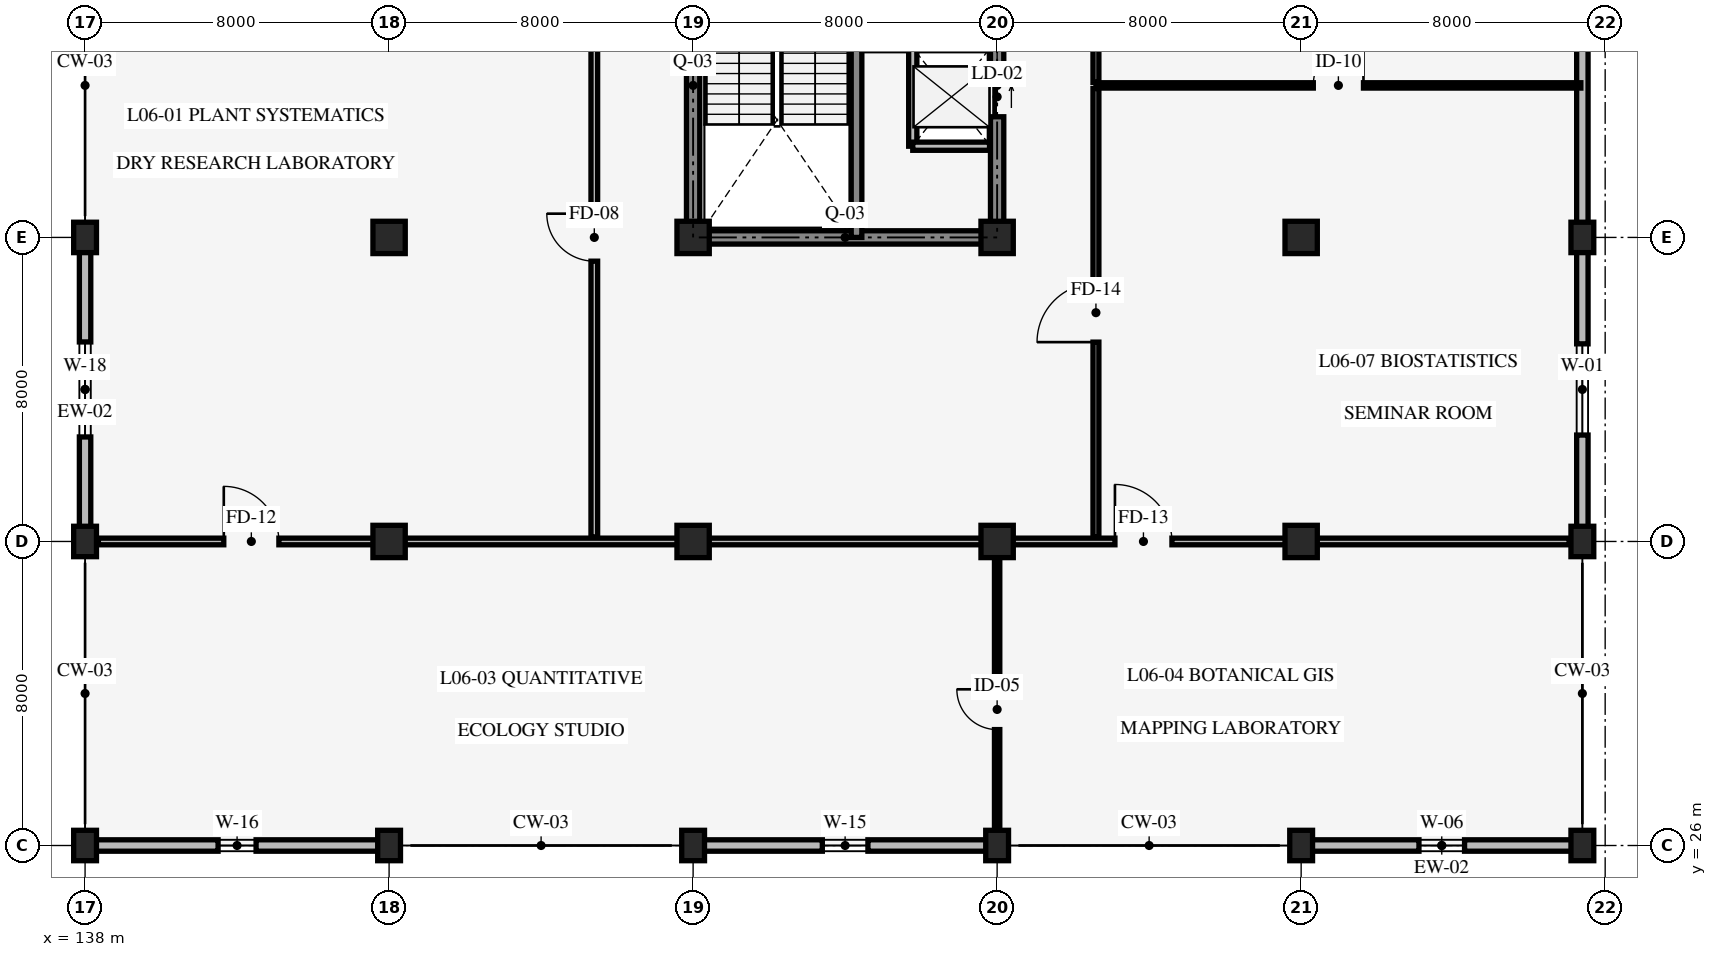
"""IFC4 building model, lengths in metres.
Left out: names, types, materials, properties, quantities, classifications, styles, units other than length and angle.
Written with IfcOpenShell. Run it as: python <this file> out.ifc"""

import sys

from ifc_helpers import new_model, si_unit, direction, frame, frame_2d, origin, origin_2d, place, context, subcontext, project, spatial, rectangle, extrude, element, fill, save


model = new_model("IFC4")
c1 = context("Model", 3, precision=1e-05, world=origin(), true_north=direction((0.0, 1.0)))
c2 = subcontext(c1, "Body", "Model", "MODEL_VIEW")
j1 = project(units=[si_unit("LENGTHUNIT", "METRE"), si_unit("PLANEANGLEUNIT", "RADIAN")], contexts=[c1])
p1 = place(None, origin())
s1 = spatial("IfcSite", under=j1, at=p1, CompositionType="ELEMENT")
p2 = place(p1, origin())
s2 = spatial("IfcBuilding", under=s1, at=p2, CompositionType="ELEMENT")
p3 = place(p2, frame((0.0, 0.0, 23.4)))
s3 = spatial("IfcBuildingStorey", under=s2, at=p3, CompositionType="ELEMENT", Elevation=23.4)
p4 = place(p3, frame((154.0, 42.0, 0.0), z_axis=(0.0, 0.0, 1.0), x_axis=(1.0, 0.0, 0.0)))
e1 = element("IfcWall", 1, at=p4, inside=s3, PredefinedType="SHEAR", context=c2, shape_type="SweptSolid", body=[
    extrude(rectangle(XDim=8.0, YDim=0.35, at=frame_2d((4.0, 0.0))), origin(), (0.0, 0.0, 1.0), 3.95),
])
p5 = place(p3, frame((162.0, 42.0, 0.0), z_axis=(0.0, 0.0, 1.0), x_axis=(0.0, 1.0, 0.0)))
e2 = element("IfcWall", 2, at=p5, inside=s3, PredefinedType="SHEAR", context=c2, shape_type="SweptSolid", body=[
    extrude(rectangle(XDim=8.0, YDim=0.35, at=frame_2d((4.0, 0.0))), origin(), (0.0, 0.0, 1.0), 3.95),
])
p6 = place(p5, frame((3.175, 0.0, 0.0)))
e3 = element("IfcOpeningElement", 3, at=p6, cuts=e2, PredefinedType="OPENING", context=c2, shape_type="SweptSolid", body=[
    extrude(rectangle(XDim=1.05, YDim=2.2, at=frame_2d((0.525, 1.1))), frame((0.0, 0.185, 0.0), z_axis=(0.0, -1.0, 0.0), x_axis=(1.0, 0.0, 0.0)), (0.0, 0.0, 1.0), 0.37),
])
p7 = place(p3, frame((154.0, 50.0, 0.0), z_axis=(0.0, 0.0, 1.0), x_axis=(0.0, -1.0, 0.0)))
e4 = element("IfcWall", 4, at=p7, inside=s3, PredefinedType="SHEAR", context=c2, shape_type="SweptSolid", body=[
    extrude(rectangle(XDim=8.0, YDim=0.35, at=frame_2d((4.0, 0.0))), origin(), (0.0, 0.0, 1.0), 3.95),
])
p8 = place(p3, frame((158.3, 42.0, 0.0), z_axis=(0.0, 0.0, 1.0), x_axis=(0.0, 1.0, 0.0)))
e5 = element("IfcWall", 5, at=p8, inside=s3, PredefinedType="SHEAR", context=c2, shape_type="SweptSolid", body=[
    extrude(rectangle(XDim=8.0, YDim=0.28, at=frame_2d((4.0, 0.0))), origin(), (0.0, 0.0, 1.0), 3.95),
])
for number, where, z_axis, x_axis in (
    (6, (138.0, 26.0, 0.0), (0.0, 0.0, 1.0), (1.0, 0.0, 0.0)),
    (7, (138.0, 34.0, 0.0), (0.0, 0.0, 1.0), (1.0, 0.0, 0.0)),
    (8, (138.0, 42.0, 0.0), (0.0, 0.0, 1.0), (1.0, 0.0, 0.0)),
    (9, (146.0, 26.0, 0.0), (0.0, 0.0, 1.0), (1.0, 0.0, 0.0)),
):
    element("IfcColumn", number, at=place(p3, frame(where, z_axis=z_axis, x_axis=x_axis)), inside=s3, PredefinedType="COLUMN", context=c2, shape_type="SweptSolid", body=[
        extrude(rectangle(XDim=0.6, YDim=0.8, at=origin_2d()), origin(), (0.0, 0.0, 1.0), 4.2),
    ])
for number, where, z_axis, x_axis in (
    (10, (146.0, 34.0, 0.0), (0.0, 0.0, 1.0), (1.0, 0.0, 0.0)),
    (11, (146.0, 42.0, 0.0), (0.0, 0.0, 1.0), (1.0, 0.0, 0.0)),
):
    element("IfcColumn", number, at=place(p3, frame(where, z_axis=z_axis, x_axis=x_axis)), inside=s3, PredefinedType="COLUMN", context=c2, shape_type="SweptSolid", body=[
        extrude(rectangle(XDim=0.85, YDim=0.85, at=origin_2d()), origin(), (0.0, 0.0, 1.0), 4.2),
    ])
p9 = place(p3, frame((154.0, 26.0, 0.0), z_axis=(0.0, 0.0, 1.0), x_axis=(1.0, 0.0, 0.0)))
e12 = element("IfcColumn", 12, at=p9, inside=s3, PredefinedType="COLUMN", context=c2, shape_type="SweptSolid", body=[
    extrude(rectangle(XDim=0.6, YDim=0.8, at=origin_2d()), origin(), (0.0, 0.0, 1.0), 4.2),
])
for number, where, z_axis, x_axis in (
    (13, (154.0, 34.0, 0.0), (0.0, 0.0, 1.0), (1.0, 0.0, 0.0)),
    (14, (154.0, 42.0, 0.0), (0.0, 0.0, 1.0), (1.0, 0.0, 0.0)),
):
    element("IfcColumn", number, at=place(p3, frame(where, z_axis=z_axis, x_axis=x_axis)), inside=s3, PredefinedType="COLUMN", context=c2, shape_type="SweptSolid", body=[
        extrude(rectangle(XDim=0.85, YDim=0.85, at=origin_2d()), origin(), (0.0, 0.0, 1.0), 4.2),
    ])
p10 = place(p3, frame((162.0, 26.0, 0.0), z_axis=(0.0, 0.0, 1.0), x_axis=(1.0, 0.0, 0.0)))
e15 = element("IfcColumn", 15, at=p10, inside=s3, PredefinedType="COLUMN", context=c2, shape_type="SweptSolid", body=[
    extrude(rectangle(XDim=0.6, YDim=0.8, at=origin_2d()), origin(), (0.0, 0.0, 1.0), 4.2),
])
for number, where, z_axis, x_axis in (
    (16, (162.0, 34.0, 0.0), (0.0, 0.0, 1.0), (1.0, 0.0, 0.0)),
    (17, (162.0, 42.0, 0.0), (0.0, 0.0, 1.0), (1.0, 0.0, 0.0)),
):
    element("IfcColumn", number, at=place(p3, frame(where, z_axis=z_axis, x_axis=x_axis)), inside=s3, PredefinedType="COLUMN", context=c2, shape_type="SweptSolid", body=[
        extrude(rectangle(XDim=0.85, YDim=0.85, at=origin_2d()), origin(), (0.0, 0.0, 1.0), 4.2),
    ])
p11 = place(p3, frame((170.0, 26.0, 0.0), z_axis=(0.0, 0.0, 1.0), x_axis=(1.0, 0.0, 0.0)))
e18 = element("IfcColumn", 18, at=p11, inside=s3, PredefinedType="COLUMN", context=c2, shape_type="SweptSolid", body=[
    extrude(rectangle(XDim=0.6, YDim=0.8, at=origin_2d()), origin(), (0.0, 0.0, 1.0), 4.2),
])
for number, where, z_axis, x_axis in (
    (19, (170.0, 34.0, 0.0), (0.0, 0.0, 1.0), (1.0, 0.0, 0.0)),
    (20, (170.0, 42.0, 0.0), (0.0, 0.0, 1.0), (1.0, 0.0, 0.0)),
):
    element("IfcColumn", number, at=place(p3, frame(where, z_axis=z_axis, x_axis=x_axis)), inside=s3, PredefinedType="COLUMN", context=c2, shape_type="SweptSolid", body=[
        extrude(rectangle(XDim=0.85, YDim=0.85, at=origin_2d()), origin(), (0.0, 0.0, 1.0), 4.2),
    ])
for number, where, z_axis, x_axis in (
    (21, (177.4, 26.0, 0.0), (0.0, 0.0, 1.0), (1.0, 0.0, 0.0)),
    (22, (177.4, 34.0, 0.0), (0.0, 0.0, 1.0), (1.0, 0.0, 0.0)),
    (23, (177.4, 42.0, 0.0), (0.0, 0.0, 1.0), (1.0, 0.0, 0.0)),
):
    element("IfcColumn", number, at=place(p3, frame(where, z_axis=z_axis, x_axis=x_axis)), inside=s3, PredefinedType="COLUMN", context=c2, shape_type="SweptSolid", body=[
        extrude(rectangle(XDim=0.6, YDim=0.8, at=origin_2d()), origin(), (0.0, 0.0, 1.0), 4.2),
    ])
p12 = place(p3, frame((177.4, 26.0, 0.0), z_axis=(0.0, 0.0, 1.0), x_axis=(-1.0, 0.0, 0.0)))
e24 = element("IfcWall", 24, at=p12, inside=s3, PredefinedType="STANDARD", context=c2, shape_type="SweptSolid", body=[
    extrude(rectangle(XDim=7.4, YDim=0.3, at=frame_2d((3.7, 0.0))), origin(), (0.0, 0.0, 1.0), 3.4),
])
p13 = place(p12, frame((3.1, 0.0, 0.85)))
e25 = element("IfcOpeningElement", 25, at=p13, cuts=e24, PredefinedType="OPENING", context=c2, shape_type="SweptSolid", body=[
    extrude(rectangle(XDim=1.2, YDim=1.2, at=frame_2d((0.6, 0.6))), frame((0.0, 0.16, 0.0), z_axis=(0.0, -1.0, 0.0), x_axis=(1.0, 0.0, 0.0)), (0.0, 0.0, 1.0), 0.32),
])
p14 = place(p3, frame((162.0, 26.0, 0.0), z_axis=(0.0, 0.0, 1.0), x_axis=(-1.0, 0.0, 0.0)))
e26 = element("IfcWall", 26, at=p14, inside=s3, PredefinedType="STANDARD", context=c2, shape_type="SweptSolid", body=[
    extrude(rectangle(XDim=8.0, YDim=0.3, at=frame_2d((4.0, 0.0))), origin(), (0.0, 0.0, 1.0), 3.4),
])
p15 = place(p14, frame((3.4, 0.0, 0.85)))
e27 = element("IfcOpeningElement", 27, at=p15, cuts=e26, PredefinedType="OPENING", context=c2, shape_type="SweptSolid", body=[
    extrude(rectangle(XDim=1.2, YDim=1.8, at=frame_2d((0.6, 0.9))), frame((0.0, 0.16, 0.0), z_axis=(0.0, -1.0, 0.0), x_axis=(1.0, 0.0, 0.0)), (0.0, 0.0, 1.0), 0.32),
])
p16 = place(p3, frame((146.0, 26.0, 0.0), z_axis=(0.0, 0.0, 1.0), x_axis=(-1.0, 0.0, 0.0)))
e28 = element("IfcWall", 28, at=p16, inside=s3, PredefinedType="STANDARD", context=c2, shape_type="SweptSolid", body=[
    extrude(rectangle(XDim=8.0, YDim=0.3, at=frame_2d((4.0, 0.0))), origin(), (0.0, 0.0, 1.0), 3.4),
])
p17 = place(p16, frame((3.5, 0.0, 0.85)))
e29 = element("IfcOpeningElement", 29, at=p17, cuts=e28, PredefinedType="OPENING", context=c2, shape_type="SweptSolid", body=[
    extrude(rectangle(XDim=1.0, YDim=1.5, at=frame_2d((0.5, 0.75))), frame((0.0, 0.16, 0.0), z_axis=(0.0, -1.0, 0.0), x_axis=(1.0, 0.0, 0.0)), (0.0, 0.0, 1.0), 0.32),
])
p18 = place(p3, frame((138.0, 34.0, 0.0), z_axis=(0.0, 0.0, 1.0), x_axis=(0.0, 1.0, 0.0)))
e30 = element("IfcWall", 30, at=p18, inside=s3, PredefinedType="STANDARD", context=c2, shape_type="SweptSolid", body=[
    extrude(rectangle(XDim=8.0, YDim=0.3, at=frame_2d((4.0, 0.0))), origin(), (0.0, 0.0, 1.0), 3.19),
])
p19 = place(p18, frame((2.75, 0.0, 0.85)))
e31 = element("IfcOpeningElement", 31, at=p19, cuts=e30, PredefinedType="OPENING", context=c2, shape_type="SweptSolid", body=[
    extrude(rectangle(XDim=2.5, YDim=1.8, at=frame_2d((1.25, 0.9))), frame((0.0, 0.16, 0.0), z_axis=(0.0, -1.0, 0.0), x_axis=(1.0, 0.0, 0.0)), (0.0, 0.0, 1.0), 0.32),
])
p20 = place(p3, frame((177.4, 50.0, 0.0), z_axis=(0.0, 0.0, 1.0), x_axis=(0.0, -1.0, 0.0)))
e32 = element("IfcWall", 32, at=p20, inside=s3, PredefinedType="STANDARD", context=c2, shape_type="SweptSolid", body=[
    extrude(rectangle(XDim=8.0, YDim=0.3, at=frame_2d((4.0, 0.0))), origin(), (0.0, 0.0, 1.0), 3.19),
])
p21 = place(p3, frame((177.4, 42.0, 0.0), z_axis=(0.0, 0.0, 1.0), x_axis=(0.0, -1.0, 0.0)))
e33 = element("IfcWall", 33, at=p21, inside=s3, PredefinedType="STANDARD", context=c2, shape_type="SweptSolid", body=[
    extrude(rectangle(XDim=8.0, YDim=0.3, at=frame_2d((4.0, 0.0))), origin(), (0.0, 0.0, 1.0), 3.19),
])
p22 = place(p21, frame((2.8, 0.0, 0.85)))
e34 = element("IfcOpeningElement", 34, at=p22, cuts=e33, PredefinedType="OPENING", context=c2, shape_type="SweptSolid", body=[
    extrude(rectangle(XDim=2.4, YDim=1.8, at=frame_2d((1.2, 0.9))), frame((0.0, 0.16, 0.0), z_axis=(0.0, -1.0, 0.0), x_axis=(1.0, 0.0, 0.0)), (0.0, 0.0, 1.0), 0.32),
])
p23 = place(p3, frame((159.78, 44.4, 0.0), z_axis=(0.0, 0.0, 1.0), x_axis=(0.0, 1.0, 0.0)))
e35 = element("IfcWall", 35, at=p23, inside=s3, PredefinedType="STANDARD", context=c2, shape_type="SweptSolid", body=[
    extrude(rectangle(XDim=2.62, YDim=0.215, at=frame_2d((1.31, 0.0))), origin(), (0.0, 0.0, 1.0), 3.9),
])
p24 = place(p3, frame((159.78, 44.4, 0.0), z_axis=(0.0, 0.0, 1.0), x_axis=(1.0, 0.0, 0.0)))
e36 = element("IfcWall", 36, at=p24, inside=s3, PredefinedType="STANDARD", context=c2, shape_type="SweptSolid", body=[
    extrude(rectangle(XDim=2.02, YDim=0.215, at=frame_2d((1.01, 0.0))), origin(), (0.0, 0.0, 1.0), 3.9),
])
p25 = place(p3, frame((151.4, 34.12, 0.0), z_axis=(0.0, 0.0, 1.0), x_axis=(0.0, 1.0, 0.0)))
e37 = element("IfcWall", 37, at=p25, inside=s3, PredefinedType="STANDARD", context=c2, shape_type="SweptSolid", body=[
    extrude(rectangle(XDim=15.76, YDim=0.175, at=frame_2d((7.88, 0.0))), origin(), (0.0, 0.0, 1.0), 3.9),
])
p26 = place(p25, frame((7.255, 0.0, 0.0)))
e38 = element("IfcOpeningElement", 38, at=p26, cuts=e37, PredefinedType="OPENING", context=c2, shape_type="SweptSolid", body=[
    extrude(rectangle(XDim=1.25, YDim=2.15, at=frame_2d((0.625, 1.075))), frame((0.0, 0.098, 0.0), z_axis=(0.0, -1.0, 0.0), x_axis=(1.0, 0.0, 0.0)), (0.0, 0.0, 1.0), 0.195),
])
p27 = place(p3, frame((164.6, 34.12, 0.0), z_axis=(0.0, 0.0, 1.0), x_axis=(0.0, 1.0, 0.0)))
e39 = element("IfcWall", 39, at=p27, inside=s3, PredefinedType="STANDARD", context=c2, shape_type="SweptSolid", body=[
    extrude(rectangle(XDim=11.8, YDim=0.155, at=frame_2d((5.9, 0.0))), origin(), (0.0, 0.0, 1.0), 3.9),
])
p28 = place(p27, frame((5.125, 0.0, 0.0)))
e40 = element("IfcOpeningElement", 40, at=p28, cuts=e39, PredefinedType="OPENING", context=c2, shape_type="SweptSolid", body=[
    extrude(rectangle(XDim=1.55, YDim=2.25, at=frame_2d((0.775, 1.125))), frame((0.0, 0.087, 0.0), z_axis=(0.0, -1.0, 0.0), x_axis=(1.0, 0.0, 0.0)), (0.0, 0.0, 1.0), 0.175),
])
p29 = place(p3, frame((164.6, 46.0, 0.0), z_axis=(0.0, 0.0, 1.0), x_axis=(1.0, 0.0, 0.0)))
e41 = element("IfcWall", 41, at=p29, inside=s3, PredefinedType="STANDARD", context=c2, shape_type="SweptSolid", body=[
    extrude(rectangle(XDim=12.76, YDim=0.14, at=frame_2d((6.38, 0.0))), origin(), (0.0, 0.0, 1.0), 3.9),
])
p30 = place(p29, frame((5.72, 0.0, 0.0)))
e42 = element("IfcOpeningElement", 42, at=p30, cuts=e41, PredefinedType="OPENING", context=c2, shape_type="SweptSolid", body=[
    extrude(rectangle(XDim=1.32, YDim=2.16, at=frame_2d((0.66, 1.08))), frame((0.0, 0.08, 0.0), z_axis=(0.0, -1.0, 0.0), x_axis=(1.0, 0.0, 0.0)), (0.0, 0.0, 1.0), 0.16),
])
p31 = place(p3, frame((164.6, 46.08, 0.0), z_axis=(0.0, 0.0, 1.0), x_axis=(0.0, 1.0, 0.0)))
e43 = element("IfcWall", 43, at=p31, inside=s3, PredefinedType="STANDARD", context=c2, shape_type="SweptSolid", body=[
    extrude(rectangle(XDim=3.84, YDim=0.155, at=frame_2d((1.92, 0.0))), origin(), (0.0, 0.0, 1.0), 3.9),
])
p32 = place(p31, frame((1.12, 0.0, 0.0)))
e44 = element("IfcOpeningElement", 44, at=p32, cuts=e43, PredefinedType="OPENING", context=c2, shape_type="SweptSolid", body=[
    extrude(rectangle(XDim=1.6, YDim=2.25, at=frame_2d((0.8, 1.125))), frame((0.0, 0.087, 0.0), z_axis=(0.0, -1.0, 0.0), x_axis=(1.0, 0.0, 0.0)), (0.0, 0.0, 1.0), 0.175),
])
p33 = place(p3, frame((138.35, 34.0, 0.0), z_axis=(0.0, 0.0, 1.0), x_axis=(1.0, 0.0, 0.0)))
e45 = element("IfcWall", 45, at=p33, inside=s3, PredefinedType="STANDARD", context=c2, shape_type="SweptSolid", body=[
    extrude(rectangle(XDim=23.3, YDim=0.175, at=frame_2d((11.65, 0.0))), origin(), (0.0, 0.0, 1.0), 3.14),
])
p34 = place(p33, frame((3.3, 0.0, 0.0)))
e46 = element("IfcOpeningElement", 46, at=p34, cuts=e45, PredefinedType="OPENING", context=c2, shape_type="SweptSolid", body=[
    extrude(rectangle(XDim=1.45, YDim=2.2, at=frame_2d((0.725, 1.1))), frame((0.0, 0.098, 0.0), z_axis=(0.0, -1.0, 0.0), x_axis=(1.0, 0.0, 0.0)), (0.0, 0.0, 1.0), 0.195),
])
p35 = place(p3, frame((162.0, 26.05, 0.0), z_axis=(0.0, 0.0, 1.0), x_axis=(0.0, 1.0, 0.0)))
e47 = element("IfcWall", 47, at=p35, inside=s3, PredefinedType="STANDARD", context=c2, shape_type="SweptSolid", body=[
    extrude(rectangle(XDim=7.83, YDim=0.14, at=frame_2d((3.915, 0.0))), origin(), (0.0, 0.0, 1.0), 3.9),
])
p36 = place(p35, frame((3.0, 0.0, 0.0)))
e48 = element("IfcOpeningElement", 48, at=p36, cuts=e47, PredefinedType="OPENING", context=c2, shape_type="SweptSolid", body=[
    extrude(rectangle(XDim=1.06, YDim=2.12, at=frame_2d((0.53, 1.06))), frame((0.0, 0.08, 0.0), z_axis=(0.0, -1.0, 0.0), x_axis=(1.0, 0.0, 0.0)), (0.0, 0.0, 1.0), 0.16),
])
p37 = place(p3, frame((162.35, 34.0, 0.0), z_axis=(0.0, 0.0, 1.0), x_axis=(1.0, 0.0, 0.0)))
e49 = element("IfcWall", 49, at=p37, inside=s3, PredefinedType="STANDARD", context=c2, shape_type="SweptSolid", body=[
    extrude(rectangle(XDim=14.7, YDim=0.175, at=frame_2d((7.35, 0.0))), origin(), (0.0, 0.0, 1.0), 3.14),
])
p38 = place(p37, frame((2.75, 0.0, 0.0)))
e50 = element("IfcOpeningElement", 50, at=p38, cuts=e49, PredefinedType="OPENING", context=c2, shape_type="SweptSolid", body=[
    extrude(rectangle(XDim=1.5, YDim=2.2, at=frame_2d((0.75, 1.1))), frame((0.0, 0.098, 0.0), z_axis=(0.0, -1.0, 0.0), x_axis=(1.0, 0.0, 0.0)), (0.0, 0.0, 1.0), 0.195),
])
p39 = place(p13, origin())
e51 = element("IfcWindow", 51, at=p39, inside=s3, PartitioningType="SINGLE_PANEL", PredefinedType="WINDOW", context=c2, shape_type="SweptSolid", body=[
    extrude(rectangle(XDim=1.2, YDim=1.2, at=frame_2d((0.6, 0.6))), frame((0.0, 0.03, 0.0), z_axis=(0.0, -1.0, 0.0), x_axis=(1.0, 0.0, 0.0)), (0.0, 0.0, 1.0), 0.06),
])
fill(e25, e51)
p40 = place(p15, origin())
e52 = element("IfcWindow", 52, at=p40, inside=s3, PartitioningType="SINGLE_PANEL", PredefinedType="WINDOW", context=c2, shape_type="SweptSolid", body=[
    extrude(rectangle(XDim=1.2, YDim=1.8, at=frame_2d((0.6, 0.9))), frame((0.0, 0.03, 0.0), z_axis=(0.0, -1.0, 0.0), x_axis=(1.0, 0.0, 0.0)), (0.0, 0.0, 1.0), 0.06),
])
fill(e27, e52)
p41 = place(p17, origin())
e53 = element("IfcWindow", 53, at=p41, inside=s3, PartitioningType="SINGLE_PANEL", PredefinedType="WINDOW", context=c2, shape_type="SweptSolid", body=[
    extrude(rectangle(XDim=1.0, YDim=1.5, at=frame_2d((0.5, 0.75))), frame((0.0, 0.03, 0.0), z_axis=(0.0, -1.0, 0.0), x_axis=(1.0, 0.0, 0.0)), (0.0, 0.0, 1.0), 0.06),
])
fill(e29, e53)
p42 = place(p19, origin())
e54 = element("IfcWindow", 54, at=p42, inside=s3, PartitioningType="SINGLE_PANEL", PredefinedType="WINDOW", context=c2, shape_type="SweptSolid", body=[
    extrude(rectangle(XDim=2.5, YDim=1.8, at=frame_2d((1.25, 0.9))), frame((0.0, 0.03, 0.0), z_axis=(0.0, -1.0, 0.0), x_axis=(1.0, 0.0, 0.0)), (0.0, 0.0, 1.0), 0.06),
])
fill(e31, e54)
p43 = place(p22, origin())
e55 = element("IfcWindow", 55, at=p43, inside=s3, PartitioningType="SINGLE_PANEL", PredefinedType="WINDOW", context=c2, shape_type="SweptSolid", body=[
    extrude(rectangle(XDim=2.4, YDim=1.8, at=frame_2d((1.2, 0.9))), frame((0.0, 0.03, 0.0), z_axis=(0.0, -1.0, 0.0), x_axis=(1.0, 0.0, 0.0)), (0.0, 0.0, 1.0), 0.06),
])
fill(e34, e55)
p44 = place(p6, origin())
e56 = element("IfcDoor", 56, at=p44, inside=s3, OperationType="SLIDING_TO_LEFT", PredefinedType="DOOR", context=c2, shape_type="SweptSolid", body=[
    extrude(rectangle(XDim=1.05, YDim=2.2, at=frame_2d((0.525, 1.1))), frame((0.0, 0.025, 0.0), z_axis=(0.0, -1.0, 0.0), x_axis=(1.0, 0.0, 0.0)), (0.0, 0.0, 1.0), 0.05),
])
fill(e3, e56)
p45 = place(p26, origin())
e57 = element("IfcDoor", 57, at=p45, inside=s3, OperationType="SINGLE_SWING_RIGHT", PredefinedType="DOOR", context=c2, shape_type="SweptSolid", body=[
    extrude(rectangle(XDim=1.25, YDim=2.15, at=frame_2d((0.625, 1.075))), frame((0.0, 0.025, 0.0), z_axis=(0.0, -1.0, 0.0), x_axis=(1.0, 0.0, 0.0)), (0.0, 0.0, 1.0), 0.05),
])
fill(e38, e57)
p46 = place(p28, origin())
e58 = element("IfcDoor", 58, at=p46, inside=s3, OperationType="SINGLE_SWING_LEFT", PredefinedType="DOOR", context=c2, shape_type="SweptSolid", body=[
    extrude(rectangle(XDim=1.55, YDim=2.25, at=frame_2d((0.775, 1.125))), frame((0.0, 0.025, 0.0), z_axis=(0.0, -1.0, 0.0), x_axis=(1.0, 0.0, 0.0)), (0.0, 0.0, 1.0), 0.05),
])
fill(e40, e58)
p47 = place(p30, origin())
e59 = element("IfcDoor", 59, at=p47, inside=s3, OperationType="SINGLE_SWING_RIGHT", PredefinedType="DOOR", context=c2, shape_type="SweptSolid", body=[
    extrude(rectangle(XDim=1.32, YDim=2.16, at=frame_2d((0.66, 1.08))), frame((0.0, 0.025, 0.0), z_axis=(0.0, -1.0, 0.0), x_axis=(1.0, 0.0, 0.0)), (0.0, 0.0, 1.0), 0.05),
])
fill(e42, e59)
p48 = place(p34, origin())
e60 = element("IfcDoor", 60, at=p48, inside=s3, OperationType="SINGLE_SWING_LEFT", PredefinedType="DOOR", context=c2, shape_type="SweptSolid", body=[
    extrude(rectangle(XDim=1.45, YDim=2.2, at=frame_2d((0.725, 1.1))), frame((0.0, 0.025, 0.0), z_axis=(0.0, -1.0, 0.0), x_axis=(1.0, 0.0, 0.0)), (0.0, 0.0, 1.0), 0.05),
])
fill(e46, e60)
p49 = place(p36, origin())
e61 = element("IfcDoor", 61, at=p49, inside=s3, OperationType="SINGLE_SWING_RIGHT", PredefinedType="DOOR", context=c2, shape_type="SweptSolid", body=[
    extrude(rectangle(XDim=1.06, YDim=2.12, at=frame_2d((0.53, 1.06))), frame((0.0, 0.025, 0.0), z_axis=(0.0, -1.0, 0.0), x_axis=(1.0, 0.0, 0.0)), (0.0, 0.0, 1.0), 0.05),
])
fill(e48, e61)
p50 = place(p38, origin())
e62 = element("IfcDoor", 62, at=p50, inside=s3, OperationType="SINGLE_SWING_LEFT", PredefinedType="DOOR", context=c2, shape_type="SweptSolid", body=[
    extrude(rectangle(XDim=1.5, YDim=2.2, at=frame_2d((0.75, 1.1))), frame((0.0, 0.025, 0.0), z_axis=(0.0, -1.0, 0.0), x_axis=(1.0, 0.0, 0.0)), (0.0, 0.0, 1.0), 0.05),
])
fill(e50, e62)
save(model, sys.argv[1])
